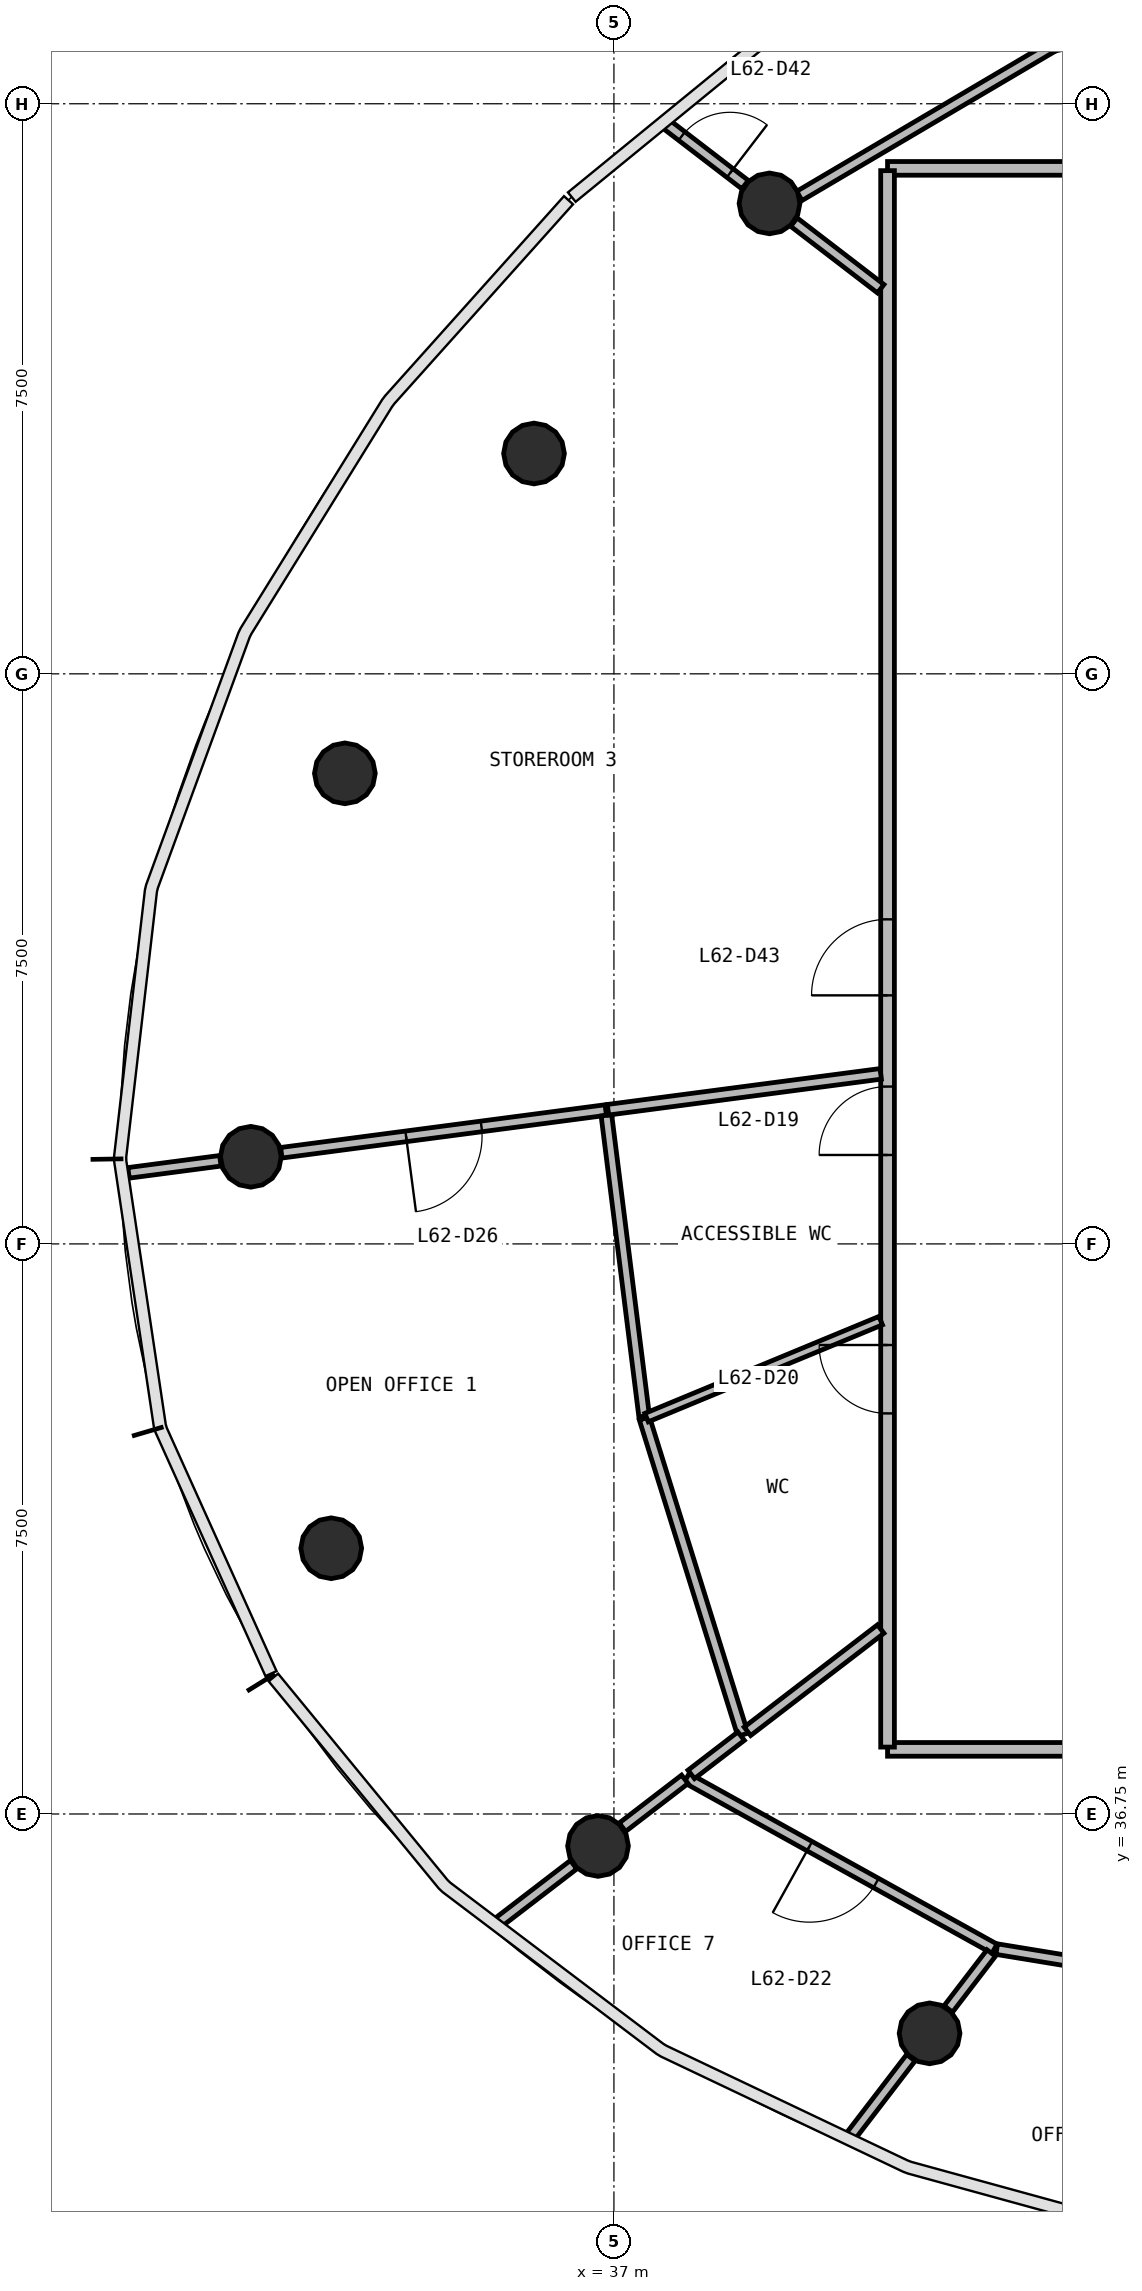
"""IFC4 building model, lengths in metres.
Left out: names, types, materials, properties, quantities, classifications, styles, units other than length and angle.
Written with IfcOpenShell. Run it as: python <this file> out.ifc"""

import sys

from ifc_helpers import new_model, si_unit, direction, frame, frame_2d, origin, origin_2d, place, context, subcontext, project, spatial, rectangle, circle, extrude, source, transform, mapped, element, fill, save


model = new_model("IFC4")
c1 = context("Model", 3, precision=1e-05, world=origin(), true_north=direction((0.0, 1.0)))
c2 = subcontext(c1, "Body", "Model", "MODEL_VIEW")
j1 = project(units=[si_unit("LENGTHUNIT", "METRE"), si_unit("PLANEANGLEUNIT", "RADIAN")], contexts=[c1])
p1 = place(None, origin())
s1 = spatial("IfcSite", under=j1, at=p1, CompositionType="ELEMENT")
p2 = place(p1, origin())
s2 = spatial("IfcBuilding", under=s1, at=p2, CompositionType="ELEMENT")
p3 = place(p2, frame((0.0, 0.0, 254.0)))
s3 = spatial("IfcBuildingStorey", under=s2, at=p3, CompositionType="ELEMENT", Elevation=254.0)
m1 = source(origin(), c2, "Body", "SweptSolid", [
    extrude(circle(Radius=0.4, at=origin_2d()), origin(), (0.0, 0.0, 1.0), 3.9),
])
for number, where, z_axis, x_axis in (
    (1, (39.047, 57.939, 0.0), (0.0, 0.0, 1.0), (1.0, 0.0, 0.0)),
    (2, (35.948, 54.649, 0.0), (0.0, 0.0, 1.0), (1.0, 0.0, 0.0)),
    (3, (33.46, 50.441, 0.0), (0.0, 0.0, 1.0), (1.0, 0.0, 0.0)),
    (4, (32.223, 45.396, 0.0), (0.0, 0.0, 1.0), (1.0, 0.0, 0.0)),
    (5, (33.281, 40.246, 0.0), (0.0, 0.0, 1.0), (1.0, 0.0, 0.0)),
    (6, (36.791, 36.329, 0.0), (0.0, 0.0, 1.0), (1.0, 0.0, 0.0)),
    (7, (41.153, 33.864, 0.0), (0.0, 0.0, 1.0), (1.0, 0.0, 0.0)),
):
    element("IfcColumn", number, at=place(p3, frame(where, z_axis=z_axis, x_axis=x_axis)), inside=s3, PredefinedType="COLUMN", context=c2, shape_type="MappedRepresentation", body=[
        mapped(m1, transform((0.0, 0.0, 0.0), scale=1.0)),
    ])
p4 = place(p3, frame((40.6, 58.4, 0.0), z_axis=(0.0, 0.0, 1.0), x_axis=(1.0, 0.0, 0.0)))
e8 = element("IfcWall", 8, at=p4, inside=s3, PredefinedType="PARTITIONING", context=c2, shape_type="SweptSolid", body=[
    extrude(rectangle(XDim=22.8, YDim=0.18, at=frame_2d((11.4, 0.0))), origin(), (0.0, 0.0, 1.0), 2.88),
])
p5 = place(p4, frame((16.15, 0.0, 0.0)))
e9 = element("IfcOpeningElement", 9, at=p5, cuts=e8, PredefinedType="OPENING", context=c2, shape_type="SweptSolid", body=[
    extrude(rectangle(XDim=1.0, YDim=2.1, at=frame_2d((0.5, 1.05))), frame((0.0, 0.1, 0.0), z_axis=(0.0, -1.0, 0.0), x_axis=(1.0, 0.0, 0.0)), (0.0, 0.0, 1.0), 0.2),
])
p6 = place(p4, frame((10.95, 0.0, 0.0)))
e10 = element("IfcOpeningElement", 10, at=p6, cuts=e8, PredefinedType="OPENING", context=c2, shape_type="SweptSolid", body=[
    extrude(rectangle(XDim=1.0, YDim=2.1, at=frame_2d((0.5, 1.05))), frame((0.0, 0.1, 0.0), z_axis=(0.0, -1.0, 0.0), x_axis=(1.0, 0.0, 0.0)), (0.0, 0.0, 1.0), 0.2),
])
p7 = place(p4, frame((8.75, 0.0, 0.0)))
e11 = element("IfcOpeningElement", 11, at=p7, cuts=e8, PredefinedType="OPENING", context=c2, shape_type="SweptSolid", body=[
    extrude(rectangle(XDim=1.0, YDim=2.1, at=frame_2d((0.5, 1.05))), frame((0.0, 0.1, 0.0), z_axis=(0.0, -1.0, 0.0), x_axis=(1.0, 0.0, 0.0)), (0.0, 0.0, 1.0), 0.2),
])
p8 = place(p4, frame((5.75, 0.0, 0.0)))
e12 = element("IfcOpeningElement", 12, at=p8, cuts=e8, PredefinedType="OPENING", context=c2, shape_type="SweptSolid", body=[
    extrude(rectangle(XDim=1.0, YDim=2.1, at=frame_2d((0.5, 1.05))), frame((0.0, 0.1, 0.0), z_axis=(0.0, -1.0, 0.0), x_axis=(1.0, 0.0, 0.0)), (0.0, 0.0, 1.0), 0.2),
])
p9 = place(p3, frame((63.4, 37.6, 0.0), z_axis=(0.0, 0.0, 1.0), x_axis=(-1.0, 0.0, 0.0)))
e13 = element("IfcWall", 13, at=p9, inside=s3, PredefinedType="PARTITIONING", context=c2, shape_type="SweptSolid", body=[
    extrude(rectangle(XDim=22.8, YDim=0.18, at=frame_2d((11.4, 0.0))), origin(), (0.0, 0.0, 1.0), 2.88),
])
p10 = place(p9, frame((10.95, 0.0, 0.0)))
e14 = element("IfcOpeningElement", 14, at=p10, cuts=e13, PredefinedType="OPENING", context=c2, shape_type="SweptSolid", body=[
    extrude(rectangle(XDim=1.0, YDim=2.1, at=frame_2d((0.5, 1.05))), frame((0.0, 0.1, 0.0), z_axis=(0.0, -1.0, 0.0), x_axis=(1.0, 0.0, 0.0)), (0.0, 0.0, 1.0), 0.2),
])
p11 = place(p9, frame((8.75, 0.0, 0.0)))
e15 = element("IfcOpeningElement", 15, at=p11, cuts=e13, PredefinedType="OPENING", context=c2, shape_type="SweptSolid", body=[
    extrude(rectangle(XDim=1.0, YDim=2.1, at=frame_2d((0.5, 1.05))), frame((0.0, 0.1, 0.0), z_axis=(0.0, -1.0, 0.0), x_axis=(1.0, 0.0, 0.0)), (0.0, 0.0, 1.0), 0.2),
])
p12 = place(p3, frame((40.6, 37.63, 0.0), z_axis=(0.0, 0.0, 1.0), x_axis=(0.0, 1.0, 0.0)))
e16 = element("IfcWall", 16, at=p12, inside=s3, PredefinedType="PARTITIONING", context=c2, shape_type="SweptSolid", body=[
    extrude(rectangle(XDim=20.74, YDim=0.18, at=frame_2d((10.37, 0.0))), origin(), (0.0, 0.0, 1.0), 2.88),
])
p13 = place(p12, frame((7.79, 0.0, 0.0)))
e17 = element("IfcOpeningElement", 17, at=p13, cuts=e16, PredefinedType="OPENING", context=c2, shape_type="SweptSolid", body=[
    extrude(rectangle(XDim=0.9, YDim=2.1, at=frame_2d((0.45, 1.05))), frame((0.0, 0.1, 0.0), z_axis=(0.0, -1.0, 0.0), x_axis=(1.0, 0.0, 0.0)), (0.0, 0.0, 1.0), 0.2),
])
p14 = place(p12, frame((4.39, 0.0, 0.0)))
e18 = element("IfcOpeningElement", 18, at=p14, cuts=e16, PredefinedType="OPENING", context=c2, shape_type="SweptSolid", body=[
    extrude(rectangle(XDim=0.9, YDim=2.1, at=frame_2d((0.45, 1.05))), frame((0.0, 0.1, 0.0), z_axis=(0.0, -1.0, 0.0), x_axis=(1.0, 0.0, 0.0)), (0.0, 0.0, 1.0), 0.2),
])
p15 = place(p12, frame((9.89, 0.0, 0.0)))
e19 = element("IfcOpeningElement", 19, at=p15, cuts=e16, PredefinedType="OPENING", context=c2, shape_type="SweptSolid", body=[
    extrude(rectangle(XDim=1.0, YDim=2.1, at=frame_2d((0.5, 1.05))), frame((0.0, 0.1, 0.0), z_axis=(0.0, -1.0, 0.0), x_axis=(1.0, 0.0, 0.0)), (0.0, 0.0, 1.0), 0.2),
])
p16 = place(p3, frame((42.007, 34.977, 0.0), z_axis=(0.0, 0.0, 1.0), x_axis=(-0.874440561865, 0.485132666149, 0.0)))
e20 = element("IfcWall", 20, at=p16, inside=s3, PredefinedType="PARTITIONING", context=c2, shape_type="SweptSolid", body=[
    extrude(rectangle(XDim=4.632, YDim=0.14, at=frame_2d((2.316, 0.0))), origin(), (0.0, 0.0, 1.0), 2.88),
])
p17 = place(p16, frame((1.782, 0.0, 0.0)))
e21 = element("IfcOpeningElement", 21, at=p17, cuts=e20, PredefinedType="OPENING", context=c2, shape_type="SweptSolid", body=[
    extrude(rectangle(XDim=1.0, YDim=2.1, at=frame_2d((0.5, 1.05))), frame((0.0, 0.08, 0.0), z_axis=(0.0, -1.0, 0.0), x_axis=(1.0, 0.0, 0.0)), (0.0, 0.0, 1.0), 0.16),
])
p18 = place(p3, frame((46.313, 34.271, 0.0), z_axis=(0.0, 0.0, 1.0), x_axis=(-0.986813949389, 0.161858670735, 0.0)))
e22 = element("IfcWall", 22, at=p18, inside=s3, PredefinedType="PARTITIONING", context=c2, shape_type="SweptSolid", body=[
    extrude(rectangle(XDim=4.333, YDim=0.14, at=frame_2d((2.167, 0.0))), origin(), (0.0, 0.0, 1.0), 2.88),
])
p19 = place(p18, frame((1.684, 0.0, 0.0)))
e23 = element("IfcOpeningElement", 23, at=p19, cuts=e22, PredefinedType="OPENING", context=c2, shape_type="SweptSolid", body=[
    extrude(rectangle(XDim=1.0, YDim=2.1, at=frame_2d((0.5, 1.05))), frame((0.0, 0.08, 0.0), z_axis=(0.0, -1.0, 0.0), x_axis=(1.0, 0.0, 0.0)), (0.0, 0.0, 1.0), 0.16),
])
p20 = place(p3, frame((37.402, 41.953, 0.0), z_axis=(0.0, 0.0, 1.0), x_axis=(0.297324216062, -0.954776576244, 0.0)))
e24 = element("IfcWall", 24, at=p20, inside=s3, PredefinedType="PARTITIONING", context=c2, shape_type="SweptSolid", body=[
    extrude(rectangle(XDim=4.358, YDim=0.14, at=frame_2d((2.179, 0.0))), origin(), (0.0, 0.0, 1.0), 2.88),
])
p21 = place(p3, frame((36.892, 46.011, 0.0), z_axis=(0.0, 0.0, 1.0), x_axis=(-0.991450821021, -0.130480916219, 0.0)))
e25 = element("IfcWall", 25, at=p21, inside=s3, PredefinedType="PARTITIONING", context=c2, shape_type="SweptSolid", body=[
    extrude(rectangle(XDim=4.305, YDim=0.14, at=frame_2d((2.153, 0.0))), origin(), (0.0, 0.0, 1.0), 2.88),
])
p22 = place(p21, frame((1.65, 0.0, 0.0)))
e26 = element("IfcOpeningElement", 26, at=p22, cuts=e25, PredefinedType="OPENING", context=c2, shape_type="SweptSolid", body=[
    extrude(rectangle(XDim=1.0, YDim=2.1, at=frame_2d((0.5, 1.05))), frame((0.0, 0.08, 0.0), z_axis=(0.0, -1.0, 0.0), x_axis=(1.0, 0.0, 0.0)), (0.0, 0.0, 1.0), 0.16),
])
p23 = place(p3, frame((36.901, 45.942, 0.0), z_axis=(0.0, 0.0, 1.0), x_axis=(0.124464006599, -0.992224123402, 0.0)))
e27 = element("IfcWall", 27, at=p23, inside=s3, PredefinedType="PARTITIONING", context=c2, shape_type="SweptSolid", body=[
    extrude(rectangle(XDim=3.99, YDim=0.14, at=frame_2d((1.995, 0.0))), origin(), (0.0, 0.0, 1.0), 2.88),
])
p24 = place(p3, frame((42.759, 59.994, 0.0), z_axis=(0.0, 0.0, 1.0), x_axis=(-0.861469667811, -0.507809030485, 0.0)))
e28 = element("IfcWall", 28, at=p24, inside=s3, PredefinedType="PARTITIONING", context=c2, shape_type="SweptSolid", body=[
    extrude(rectangle(XDim=3.853, YDim=0.14, at=frame_2d((1.927, 0.0))), origin(), (0.0, 0.0, 1.0), 2.88),
])
p25 = place(p3, frame((40.51, 46.487, 0.0), z_axis=(0.0, 0.0, 1.0), x_axis=(-0.991442810517, -0.130541769077, 0.0)))
e29 = element("IfcWall", 29, at=p25, inside=s3, PredefinedType="PARTITIONING", context=c2, shape_type="SweptSolid", body=[
    extrude(rectangle(XDim=3.619, YDim=0.14, at=frame_2d((1.81, 0.0))), origin(), (0.0, 0.0, 1.0), 2.88),
])
p26 = place(p3, frame((40.51, 39.183, 0.0), z_axis=(0.0, 0.0, 1.0), x_axis=(-0.793391200756, -0.608712085113, 0.0)))
e30 = element("IfcWall", 30, at=p26, inside=s3, PredefinedType="PARTITIONING", context=c2, shape_type="SweptSolid", body=[
    extrude(rectangle(XDim=2.21, YDim=0.14, at=frame_2d((1.105, 0.0))), origin(), (0.0, 0.0, 1.0), 2.88),
])
p27 = place(p3, frame((40.51, 56.817, 0.0), z_axis=(0.0, 0.0, 1.0), x_axis=(-0.793316945216, 0.608808857059, 0.0)))
e31 = element("IfcWall", 31, at=p27, inside=s3, PredefinedType="PARTITIONING", context=c2, shape_type="SweptSolid", body=[
    extrude(rectangle(XDim=1.44, YDim=0.14, at=frame_2d((0.72, 0.0))), origin(), (0.0, 0.0, 1.0), 2.88),
])
p28 = place(p3, frame((37.69, 58.98, 0.0), z_axis=(0.0, 0.0, 1.0), x_axis=(0.793401708575, -0.608698389048, 0.0)))
e32 = element("IfcWall", 32, at=p28, inside=s3, PredefinedType="PARTITIONING", context=c2, shape_type="SweptSolid", body=[
    extrude(rectangle(XDim=1.306, YDim=0.14, at=frame_2d((0.653, 0.0))), origin(), (0.0, 0.0, 1.0), 2.88),
])
p29 = place(p28, frame((0.256, 0.0, 0.0)))
e33 = element("IfcOpeningElement", 33, at=p29, cuts=e32, PredefinedType="OPENING", context=c2, shape_type="SweptSolid", body=[
    extrude(rectangle(XDim=0.8, YDim=2.1, at=frame_2d((0.4, 1.05))), frame((0.0, 0.08, 0.0), z_axis=(0.0, -1.0, 0.0), x_axis=(1.0, 0.0, 0.0)), (0.0, 0.0, 1.0), 0.16),
])
p30 = place(p3, frame((40.907, 33.543, 0.0), z_axis=(0.0, 0.0, 1.0), x_axis=(-0.608700288014, -0.793400251683, 0.0)))
e34 = element("IfcWall", 34, at=p30, inside=s3, PredefinedType="PARTITIONING", context=c2, shape_type="SweptSolid", body=[
    extrude(rectangle(XDim=1.297, YDim=0.14, at=frame_2d((0.648, 0.0))), origin(), (0.0, 0.0, 1.0), 2.88),
])
p31 = place(p3, frame((36.469, 36.083, 0.0), z_axis=(0.0, 0.0, 1.0), x_axis=(-0.793361818833, -0.608750379399, 0.0)))
e35 = element("IfcWall", 35, at=p31, inside=s3, PredefinedType="PARTITIONING", context=c2, shape_type="SweptSolid", body=[
    extrude(rectangle(XDim=1.254, YDim=0.14, at=frame_2d((0.627, 0.0))), origin(), (0.0, 0.0, 1.0), 2.88),
])
p32 = place(p3, frame((31.822, 45.344, 0.0), z_axis=(0.0, 0.0, 1.0), x_axis=(-0.991448836413, -0.13049599525, 0.0)))
e36 = element("IfcWall", 36, at=p32, inside=s3, PredefinedType="PARTITIONING", context=c2, shape_type="SweptSolid", body=[
    extrude(rectangle(XDim=1.218, YDim=0.14, at=frame_2d((0.609, 0.0))), origin(), (0.0, 0.0, 1.0), 2.88),
])
p33 = place(p3, frame((37.933, 37.206, 0.0), z_axis=(0.0, 0.0, 1.0), x_axis=(-0.79327224319, -0.608867102235, 0.0)))
e37 = element("IfcWall", 37, at=p33, inside=s3, PredefinedType="PARTITIONING", context=c2, shape_type="SweptSolid", body=[
    extrude(rectangle(XDim=1.035, YDim=0.14, at=frame_2d((0.518, 0.0))), origin(), (0.0, 0.0, 1.0), 2.88),
])
p34 = place(p3, frame((41.964, 34.921, 0.0), z_axis=(0.0, 0.0, 1.0), x_axis=(-0.608807228155, -0.79331819527, 0.0)))
e38 = element("IfcWall", 38, at=p34, inside=s3, PredefinedType="PARTITIONING", context=c2, shape_type="SweptSolid", body=[
    extrude(rectangle(XDim=0.927, YDim=0.14, at=frame_2d((0.464, 0.0))), origin(), (0.0, 0.0, 1.0), 2.88),
])
p35 = place(p3, frame((38.673, 37.774, 0.0), z_axis=(0.0, 0.0, 1.0), x_axis=(-0.793325907002, -0.608797179099, 0.0)))
e39 = element("IfcWall", 39, at=p35, inside=s3, PredefinedType="PARTITIONING", context=c2, shape_type="SweptSolid", body=[
    extrude(rectangle(XDim=0.827, YDim=0.14, at=frame_2d((0.414, 0.0))), origin(), (0.0, 0.0, 1.0), 2.88),
])
p36 = place(p3, frame((40.51, 43.241, 0.0), z_axis=(0.0, 0.0, 1.0), x_axis=(-0.92387852154, -0.382685873056, 0.0)))
e40 = element("IfcWall", 40, at=p36, inside=s3, PredefinedType="PARTITIONING", context=c2, shape_type="SweptSolid", body=[
    extrude(rectangle(XDim=3.335, YDim=0.12, at=frame_2d((1.667, 0.0))), origin(), (0.0, 0.0, 1.0), 2.88),
])
m2 = source(origin(), c2, "Body", "SweptSolid", [
    extrude(rectangle(XDim=0.9, YDim=2.1, at=frame_2d((0.45, 1.05))), frame((0.0, 0.025, 0.0), z_axis=(0.0, -1.0, 0.0), x_axis=(1.0, 0.0, 0.0)), (0.0, 0.0, 1.0), 0.05),
])
p37 = place(p13, origin())
e41 = element("IfcDoor", 41, at=p37, inside=s3, OperationType="SINGLE_SWING_LEFT", PredefinedType="DOOR", context=c2, shape_type="MappedRepresentation", body=[
    mapped(m2, transform((0.0, 0.0, 0.0), scale=1.0)),
])
fill(e17, e41)
p38 = place(p14, origin())
e42 = element("IfcDoor", 42, at=p38, inside=s3, OperationType="SINGLE_SWING_RIGHT", PredefinedType="DOOR", context=c2, shape_type="MappedRepresentation", body=[
    mapped(m2, transform((0.0, 0.0, 0.0), scale=1.0)),
])
fill(e18, e42)
m3 = source(origin(), c2, "Body", "SweptSolid", [
    extrude(rectangle(XDim=1.0, YDim=2.1, at=frame_2d((0.5, 1.05))), frame((0.0, 0.025, 0.0), z_axis=(0.0, -1.0, 0.0), x_axis=(1.0, 0.0, 0.0)), (0.0, 0.0, 1.0), 0.05),
])
p39 = place(p17, origin())
e43 = element("IfcDoor", 43, at=p39, inside=s3, OperationType="SINGLE_SWING_RIGHT", PredefinedType="DOOR", context=c2, shape_type="MappedRepresentation", body=[
    mapped(m3, transform((0.0, 0.0, 0.0), scale=1.0)),
])
fill(e21, e43)
p40 = place(p22, origin())
e44 = element("IfcDoor", 44, at=p40, inside=s3, OperationType="SINGLE_SWING_RIGHT", PredefinedType="DOOR", context=c2, shape_type="MappedRepresentation", body=[
    mapped(m3, transform((0.0, 0.0, 0.0), scale=1.0)),
])
fill(e26, e44)
m4 = source(origin(), c2, "Body", "SweptSolid", [
    extrude(rectangle(XDim=0.8, YDim=2.1, at=frame_2d((0.4, 1.05))), frame((0.0, 0.025, 0.0), z_axis=(0.0, -1.0, 0.0), x_axis=(1.0, 0.0, 0.0)), (0.0, 0.0, 1.0), 0.05),
])
p41 = place(p29, origin())
e45 = element("IfcDoor", 45, at=p41, inside=s3, OperationType="SINGLE_SWING_RIGHT", PredefinedType="DOOR", context=c2, shape_type="MappedRepresentation", body=[
    mapped(m4, transform((0.0, 0.0, 0.0), scale=1.0)),
])
fill(e33, e45)
p42 = place(p15, origin())
e46 = element("IfcDoor", 46, at=p42, inside=s3, OperationType="SINGLE_SWING_LEFT", PredefinedType="DOOR", context=c2, shape_type="MappedRepresentation", body=[
    mapped(m3, transform((0.0, 0.0, 0.0), scale=1.0)),
])
fill(e19, e46)
save(model, sys.argv[1])
